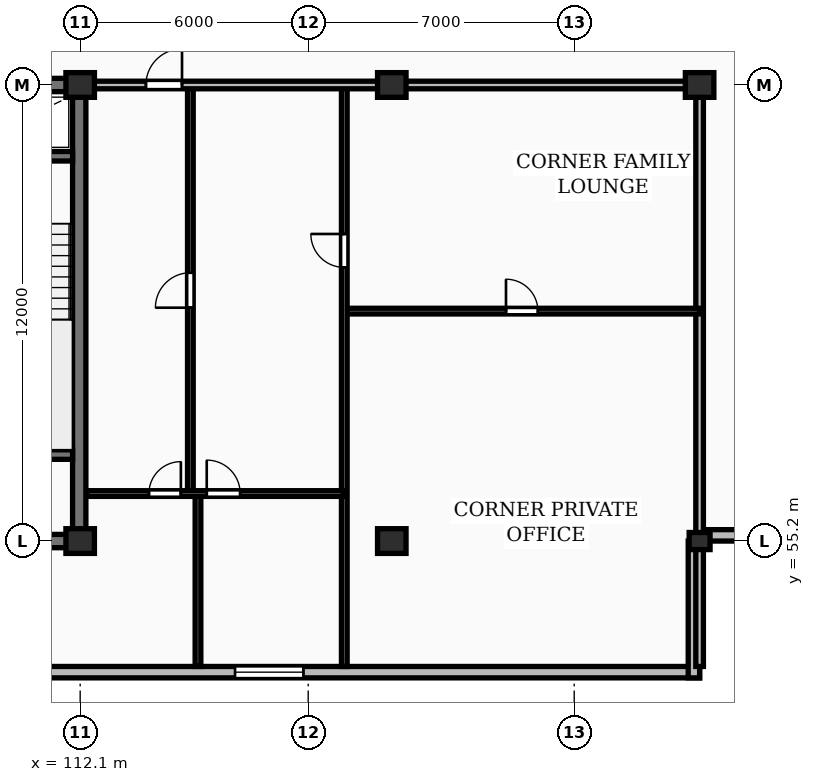
"""IFC4 building model, lengths in metres.
Left out: names, types, materials, properties, quantities, classifications, styles, units other than length and angle.
Written with IfcOpenShell. Run it as: python <this file> out.ifc"""

import sys

from ifc_helpers import new_model, si_unit, direction, frame, frame_2d, origin, origin_2d, place, context, subcontext, project, spatial, rectangle, extrude, element, fill, save


model = new_model("IFC4")
c1 = context("Model", 3, precision=1e-05, world=origin(), true_north=direction((0.0, 1.0)))
c2 = subcontext(c1, "Body", "Model", "MODEL_VIEW")
j1 = project(units=[si_unit("LENGTHUNIT", "METRE"), si_unit("PLANEANGLEUNIT", "RADIAN")], contexts=[c1])
p1 = place(None, origin())
s1 = spatial("IfcSite", under=j1, at=p1, CompositionType="ELEMENT")
p2 = place(p1, origin())
s2 = spatial("IfcBuilding", under=s1, at=p2, CompositionType="ELEMENT")
p3 = place(p2, frame((0.0, 0.0, 256.25)))
s3 = spatial("IfcBuildingStorey", under=s2, at=p3, CompositionType="ELEMENT", Elevation=256.25)
for number, where, z_axis, x_axis in (
    (1, (112.1, 55.2, 0.0), (0.0, 0.0, 1.0), (1.0, 0.0, 0.0)),
    (2, (112.1, 67.2, 0.0), (0.0, 0.0, 1.0), (1.0, 0.0, 0.0)),
    (3, (120.3, 55.2, 0.0), (0.0, 0.0, 1.0), (1.0, 0.0, 0.0)),
    (4, (120.3, 67.2, 0.0), (0.0, 0.0, 1.0), (1.0, 0.0, 0.0)),
):
    element("IfcColumn", number, at=place(p3, frame(where, z_axis=z_axis, x_axis=x_axis)), inside=s3, PredefinedType="COLUMN", context=c2, shape_type="SweptSolid", body=[
        extrude(rectangle(XDim=0.75, YDim=0.65, at=origin_2d()), origin(), (0.0, 0.0, 1.0), 3.45),
    ])
p4 = place(p3, frame((128.4, 55.2, 0.0), z_axis=(0.0, 0.0, 1.0), x_axis=(1.0, 0.0, 0.0)))
e5 = element("IfcColumn", 5, at=p4, inside=s3, PredefinedType="PILASTER", context=c2, shape_type="SweptSolid", body=[
    extrude(rectangle(XDim=0.55, YDim=0.45, at=origin_2d()), origin(), (0.0, 0.0, 1.0), 3.45),
])
p5 = place(p3, frame((128.4, 67.2, 0.0), z_axis=(0.0, 0.0, 1.0), x_axis=(1.0, 0.0, 0.0)))
e6 = element("IfcColumn", 6, at=p5, inside=s3, PredefinedType="COLUMN", context=c2, shape_type="SweptSolid", body=[
    extrude(rectangle(XDim=0.75, YDim=0.65, at=origin_2d()), origin(), (0.0, 0.0, 1.0), 3.45),
])
p6 = place(p3, frame((59.8, 51.75, 0.0), z_axis=(0.0, 0.0, 1.0), x_axis=(1.0, 0.0, 0.0)))
e7 = element("IfcWall", 7, at=p6, inside=s3, PredefinedType="STANDARD", context=c2, shape_type="SweptSolid", body=[
    extrude(rectangle(XDim=68.6, YDim=0.3, at=frame_2d((34.3, 0.0))), origin(), (0.0, 0.0, 1.0), 3.17),
])
p7 = place(p6, frame((13.025, 0.0, 0.85)))
e8 = element("IfcOpeningElement", 8, at=p7, cuts=e7, PredefinedType="OPENING", context=c2, shape_type="SweptSolid", body=[
    extrude(rectangle(XDim=1.8, YDim=1.8, at=frame_2d((0.9, 0.9))), frame((0.0, 0.16, 0.0), z_axis=(0.0, -1.0, 0.0), x_axis=(1.0, 0.0, 0.0)), (0.0, 0.0, 1.0), 0.32),
])
p8 = place(p6, frame((56.375, 0.0, 0.85)))
e9 = element("IfcOpeningElement", 9, at=p8, cuts=e7, PredefinedType="OPENING", context=c2, shape_type="SweptSolid", body=[
    extrude(rectangle(XDim=1.8, YDim=1.8, at=frame_2d((0.9, 0.9))), frame((0.0, 0.16, 0.0), z_axis=(0.0, -1.0, 0.0), x_axis=(1.0, 0.0, 0.0)), (0.0, 0.0, 1.0), 0.32),
])
p9 = place(p3, frame((128.25, 51.6, 0.0), z_axis=(0.0, 0.0, 1.0), x_axis=(0.0, 1.0, 0.0)))
e10 = element("IfcWall", 10, at=p9, inside=s3, PredefinedType="STANDARD", context=c2, shape_type="SweptSolid", body=[
    extrude(rectangle(XDim=3.6, YDim=0.3, at=frame_2d((1.8, 0.0))), origin(), (0.0, 0.0, 1.0), 3.17),
])
p10 = place(p3, frame((128.4, 55.35, 0.0), z_axis=(0.0, 0.0, 1.0), x_axis=(1.0, 0.0, 0.0)))
e11 = element("IfcWall", 11, at=p10, inside=s3, PredefinedType="STANDARD", context=c2, shape_type="SweptSolid", body=[
    extrude(rectangle(XDim=3.6, YDim=0.3, at=frame_2d((1.8, 0.0))), origin(), (0.0, 0.0, 1.0), 3.17),
])
p11 = place(p3, frame((75.95, 55.2, 0.0), z_axis=(0.0, 0.0, 1.0), x_axis=(1.0, 0.0, 0.0)))
e12 = element("IfcWall", 12, at=p11, inside=s3, PredefinedType="SHEAR", context=c2, shape_type="SweptSolid", body=[
    extrude(rectangle(XDim=36.3, YDim=0.35, at=frame_2d((18.15, 0.0))), origin(), (0.0, 0.0, 1.0), 3.45),
])
p12 = place(p3, frame((112.075, 55.375, 0.0), z_axis=(0.0, 0.0, 1.0), x_axis=(0.0, 1.0, 0.0)))
e13 = element("IfcWall", 13, at=p12, inside=s3, PredefinedType="SHEAR", context=c2, shape_type="SweptSolid", body=[
    extrude(rectangle(XDim=11.65, YDim=0.35, at=frame_2d((5.825, 0.0))), origin(), (0.0, 0.0, 1.0), 3.45),
])
p13 = place(p3, frame((75.95, 67.2, 0.0), z_axis=(0.0, 0.0, 1.0), x_axis=(1.0, 0.0, 0.0)))
e14 = element("IfcWall", 14, at=p13, inside=s3, PredefinedType="SHEAR", context=c2, shape_type="SweptSolid", body=[
    extrude(rectangle(XDim=36.3, YDim=0.35, at=frame_2d((18.15, 0.0))), origin(), (0.0, 0.0, 1.0), 3.45),
])
p14 = place(p13, frame((5.25, 0.0, 0.0)))
e15 = element("IfcOpeningElement", 15, at=p14, cuts=e14, PredefinedType="OPENING", context=c2, shape_type="SweptSolid", body=[
    extrude(rectangle(XDim=1.0, YDim=2.15, at=frame_2d((0.5, 1.075))), frame((0.0, 0.185, 0.0), z_axis=(0.0, -1.0, 0.0), x_axis=(1.0, 0.0, 0.0)), (0.0, 0.0, 1.0), 0.37),
])
p15 = place(p13, frame((21.6, 0.0, 0.0)))
e16 = element("IfcOpeningElement", 16, at=p15, cuts=e14, PredefinedType="OPENING", context=c2, shape_type="SweptSolid", body=[
    extrude(rectangle(XDim=1.5, YDim=2.2, at=frame_2d((0.75, 1.1))), frame((0.0, 0.185, 0.0), z_axis=(0.0, -1.0, 0.0), x_axis=(1.0, 0.0, 0.0)), (0.0, 0.0, 1.0), 0.37),
])
p16 = place(p13, frame((30.45, 0.0, 0.0)))
e17 = element("IfcOpeningElement", 17, at=p16, cuts=e14, PredefinedType="OPENING", context=c2, shape_type="SweptSolid", body=[
    extrude(rectangle(XDim=1.0, YDim=2.15, at=frame_2d((0.5, 1.075))), frame((0.0, 0.185, 0.0), z_axis=(0.0, -1.0, 0.0), x_axis=(1.0, 0.0, 0.0)), (0.0, 0.0, 1.0), 0.37),
])
for number, where, z_axis, x_axis in (
    (18, (108.66, 57.475, 0.0), (0.0, 0.0, 1.0), (1.0, 0.0, 0.0)),
    (19, (108.66, 65.325, 0.0), (0.0, 0.0, 1.0), (1.0, 0.0, 0.0)),
):
    element("IfcWall", number, at=place(p3, frame(where, z_axis=z_axis, x_axis=x_axis)), inside=s3, PredefinedType="SHEAR", context=c2, shape_type="SweptSolid", body=[
        extrude(rectangle(XDim=3.24, YDim=0.25, at=frame_2d((1.62, 0.0))), origin(), (0.0, 0.0, 1.0), 3.45),
    ])
p17 = place(p3, frame((128.4, 51.9, 0.0), z_axis=(0.0, 0.0, 1.0), x_axis=(0.0, 1.0, 0.0)))
e20 = element("IfcWall", 20, at=p17, inside=s3, PredefinedType="PARTITIONING", context=c2, shape_type="SweptSolid", body=[
    extrude(rectangle(XDim=15.3, YDim=0.2, at=frame_2d((7.65, 0.0))), origin(), (0.0, 0.0, 1.0), 2.477),
])
p18 = place(p3, frame((119.05, 61.25, 0.0), z_axis=(0.0, 0.0, 1.0), x_axis=(1.0, 0.0, 0.0)))
e21 = element("IfcWall", 21, at=p18, inside=s3, PredefinedType="PARTITIONING", context=c2, shape_type="SweptSolid", body=[
    extrude(rectangle(XDim=9.35, YDim=0.15, at=frame_2d((4.675, 0.0))), origin(), (0.0, 0.0, 1.0), 3.17),
])
p19 = place(p18, frame((4.255, 0.0, 0.0)))
e22 = element("IfcOpeningElement", 22, at=p19, cuts=e21, PredefinedType="OPENING", context=c2, shape_type="SweptSolid", body=[
    extrude(rectangle(XDim=0.84, YDim=2.04, at=frame_2d((0.42, 1.02))), frame((0.0, 0.085, 0.0), z_axis=(0.0, -1.0, 0.0), x_axis=(1.0, 0.0, 0.0)), (0.0, 0.0, 1.0), 0.17),
])
p20 = place(p3, frame((119.05, 51.9, 0.0), z_axis=(0.0, 0.0, 1.0), x_axis=(0.0, 1.0, 0.0)))
e23 = element("IfcWall", 23, at=p20, inside=s3, PredefinedType="PARTITIONING", context=c2, shape_type="SweptSolid", body=[
    extrude(rectangle(XDim=15.25, YDim=0.15, at=frame_2d((7.625, 0.0))), origin(), (0.0, 0.0, 1.0), 3.17),
])
p21 = place(p20, frame((10.5, 0.0, 0.0)))
e24 = element("IfcOpeningElement", 24, at=p21, cuts=e23, PredefinedType="OPENING", context=c2, shape_type="SweptSolid", body=[
    extrude(rectangle(XDim=0.88, YDim=2.06, at=frame_2d((0.44, 1.03))), frame((0.0, 0.085, 0.0), z_axis=(0.0, -1.0, 0.0), x_axis=(1.0, 0.0, 0.0)), (0.0, 0.0, 1.0), 0.17),
])
p22 = place(p3, frame((115.0, 56.45, 0.0), z_axis=(0.0, 0.0, 1.0), x_axis=(0.0, 1.0, 0.0)))
e25 = element("IfcWall", 25, at=p22, inside=s3, PredefinedType="PARTITIONING", context=c2, shape_type="SweptSolid", body=[
    extrude(rectangle(XDim=10.7, YDim=0.15, at=frame_2d((5.35, 0.0))), origin(), (0.0, 0.0, 1.0), 3.17),
])
p23 = place(p22, frame((4.89, 0.0, 0.0)))
e26 = element("IfcOpeningElement", 26, at=p23, cuts=e25, PredefinedType="OPENING", context=c2, shape_type="SweptSolid", body=[
    extrude(rectangle(XDim=0.92, YDim=2.08, at=frame_2d((0.46, 1.04))), frame((0.0, 0.085, 0.0), z_axis=(0.0, -1.0, 0.0), x_axis=(1.0, 0.0, 0.0)), (0.0, 0.0, 1.0), 0.17),
])
p24 = place(p3, frame((115.2, 51.9, 0.0), z_axis=(0.0, 0.0, 1.0), x_axis=(0.0, 1.0, 0.0)))
e27 = element("IfcWall", 27, at=p24, inside=s3, PredefinedType="PARTITIONING", context=c2, shape_type="SweptSolid", body=[
    extrude(rectangle(XDim=4.55, YDim=0.15, at=frame_2d((2.275, 0.0))), origin(), (0.0, 0.0, 1.0), 3.17),
])
p25 = place(p3, frame((112.27, 56.45, 0.0), z_axis=(0.0, 0.0, 1.0), x_axis=(1.0, 0.0, 0.0)))
e28 = element("IfcWall", 28, at=p25, inside=s3, PredefinedType="PARTITIONING", context=c2, shape_type="SweptSolid", body=[
    extrude(rectangle(XDim=6.76, YDim=0.15, at=frame_2d((3.38, 0.0))), origin(), (0.0, 0.0, 1.0), 3.17),
])
p26 = place(p25, frame((1.64, 0.0, 0.0)))
e29 = element("IfcOpeningElement", 29, at=p26, cuts=e28, PredefinedType="OPENING", context=c2, shape_type="SweptSolid", body=[
    extrude(rectangle(XDim=0.84, YDim=2.04, at=frame_2d((0.42, 1.02))), frame((0.0, 0.085, 0.0), z_axis=(0.0, -1.0, 0.0), x_axis=(1.0, 0.0, 0.0)), (0.0, 0.0, 1.0), 0.17),
])
p27 = place(p25, frame((3.16, 0.0, 0.0)))
e30 = element("IfcOpeningElement", 30, at=p27, cuts=e28, PredefinedType="OPENING", context=c2, shape_type="SweptSolid", body=[
    extrude(rectangle(XDim=0.88, YDim=2.06, at=frame_2d((0.44, 1.03))), frame((0.0, 0.085, 0.0), z_axis=(0.0, -1.0, 0.0), x_axis=(1.0, 0.0, 0.0)), (0.0, 0.0, 1.0), 0.17),
])
p28 = place(p3, frame((112.25, 67.2, 0.0), z_axis=(0.0, 0.0, 1.0), x_axis=(1.0, 0.0, 0.0)))
e31 = element("IfcWall", 31, at=p28, inside=s3, PredefinedType="PARTITIONING", context=c2, shape_type="SweptSolid", body=[
    extrude(rectangle(XDim=16.15, YDim=0.2, at=frame_2d((8.075, 0.0))), origin(), (0.0, 0.0, 1.0), 2.633),
])
p29 = place(p28, frame((1.58, 0.0, 0.0)))
e32 = element("IfcOpeningElement", 32, at=p29, cuts=e31, PredefinedType="OPENING", context=c2, shape_type="SweptSolid", body=[
    extrude(rectangle(XDim=0.95, YDim=2.15, at=frame_2d((0.475, 1.075))), frame((0.0, 0.11, 0.0), z_axis=(0.0, -1.0, 0.0), x_axis=(1.0, 0.0, 0.0)), (0.0, 0.0, 1.0), 0.22),
])
p30 = place(p8, origin())
e33 = element("IfcWindow", 33, at=p30, inside=s3, PartitioningType="SINGLE_PANEL", PredefinedType="WINDOW", context=c2, shape_type="SweptSolid", body=[
    extrude(rectangle(XDim=1.8, YDim=1.8, at=frame_2d((0.9, 0.9))), frame((0.0, 0.03, 0.0), z_axis=(0.0, -1.0, 0.0), x_axis=(1.0, 0.0, 0.0)), (0.0, 0.0, 1.0), 0.06),
])
fill(e9, e33)
p31 = place(p19, origin())
e34 = element("IfcDoor", 34, at=p31, inside=s3, OperationType="SINGLE_SWING_LEFT", PredefinedType="DOOR", context=c2, shape_type="SweptSolid", body=[
    extrude(rectangle(XDim=0.84, YDim=2.04, at=frame_2d((0.42, 1.02))), frame((0.0, 0.025, 0.0), z_axis=(0.0, -1.0, 0.0), x_axis=(1.0, 0.0, 0.0)), (0.0, 0.0, 1.0), 0.05),
])
fill(e22, e34)
p32 = place(p21, origin())
e35 = element("IfcDoor", 35, at=p32, inside=s3, OperationType="SINGLE_SWING_RIGHT", PredefinedType="DOOR", context=c2, shape_type="SweptSolid", body=[
    extrude(rectangle(XDim=0.88, YDim=2.06, at=frame_2d((0.44, 1.03))), frame((0.0, 0.025, 0.0), z_axis=(0.0, -1.0, 0.0), x_axis=(1.0, 0.0, 0.0)), (0.0, 0.0, 1.0), 0.05),
])
fill(e24, e35)
p33 = place(p23, origin())
e36 = element("IfcDoor", 36, at=p33, inside=s3, OperationType="SINGLE_SWING_LEFT", PredefinedType="DOOR", context=c2, shape_type="SweptSolid", body=[
    extrude(rectangle(XDim=0.92, YDim=2.08, at=frame_2d((0.46, 1.04))), frame((0.0, 0.025, 0.0), z_axis=(0.0, -1.0, 0.0), x_axis=(1.0, 0.0, 0.0)), (0.0, 0.0, 1.0), 0.05),
])
fill(e26, e36)
p34 = place(p26, origin())
e37 = element("IfcDoor", 37, at=p34, inside=s3, OperationType="SINGLE_SWING_RIGHT", PredefinedType="DOOR", context=c2, shape_type="SweptSolid", body=[
    extrude(rectangle(XDim=0.84, YDim=2.04, at=frame_2d((0.42, 1.02))), frame((0.0, 0.025, 0.0), z_axis=(0.0, -1.0, 0.0), x_axis=(1.0, 0.0, 0.0)), (0.0, 0.0, 1.0), 0.05),
])
fill(e29, e37)
p35 = place(p27, origin())
e38 = element("IfcDoor", 38, at=p35, inside=s3, OperationType="SINGLE_SWING_LEFT", PredefinedType="DOOR", context=c2, shape_type="SweptSolid", body=[
    extrude(rectangle(XDim=0.88, YDim=2.06, at=frame_2d((0.44, 1.03))), frame((0.0, 0.025, 0.0), z_axis=(0.0, -1.0, 0.0), x_axis=(1.0, 0.0, 0.0)), (0.0, 0.0, 1.0), 0.05),
])
fill(e30, e38)
p36 = place(p29, origin())
e39 = element("IfcDoor", 39, at=p36, inside=s3, OperationType="SINGLE_SWING_RIGHT", PredefinedType="DOOR", context=c2, shape_type="SweptSolid", body=[
    extrude(rectangle(XDim=0.95, YDim=2.15, at=frame_2d((0.475, 1.075))), frame((0.0, 0.025, 0.0), z_axis=(0.0, -1.0, 0.0), x_axis=(1.0, 0.0, 0.0)), (0.0, 0.0, 1.0), 0.05),
])
fill(e32, e39)
save(model, sys.argv[1])
